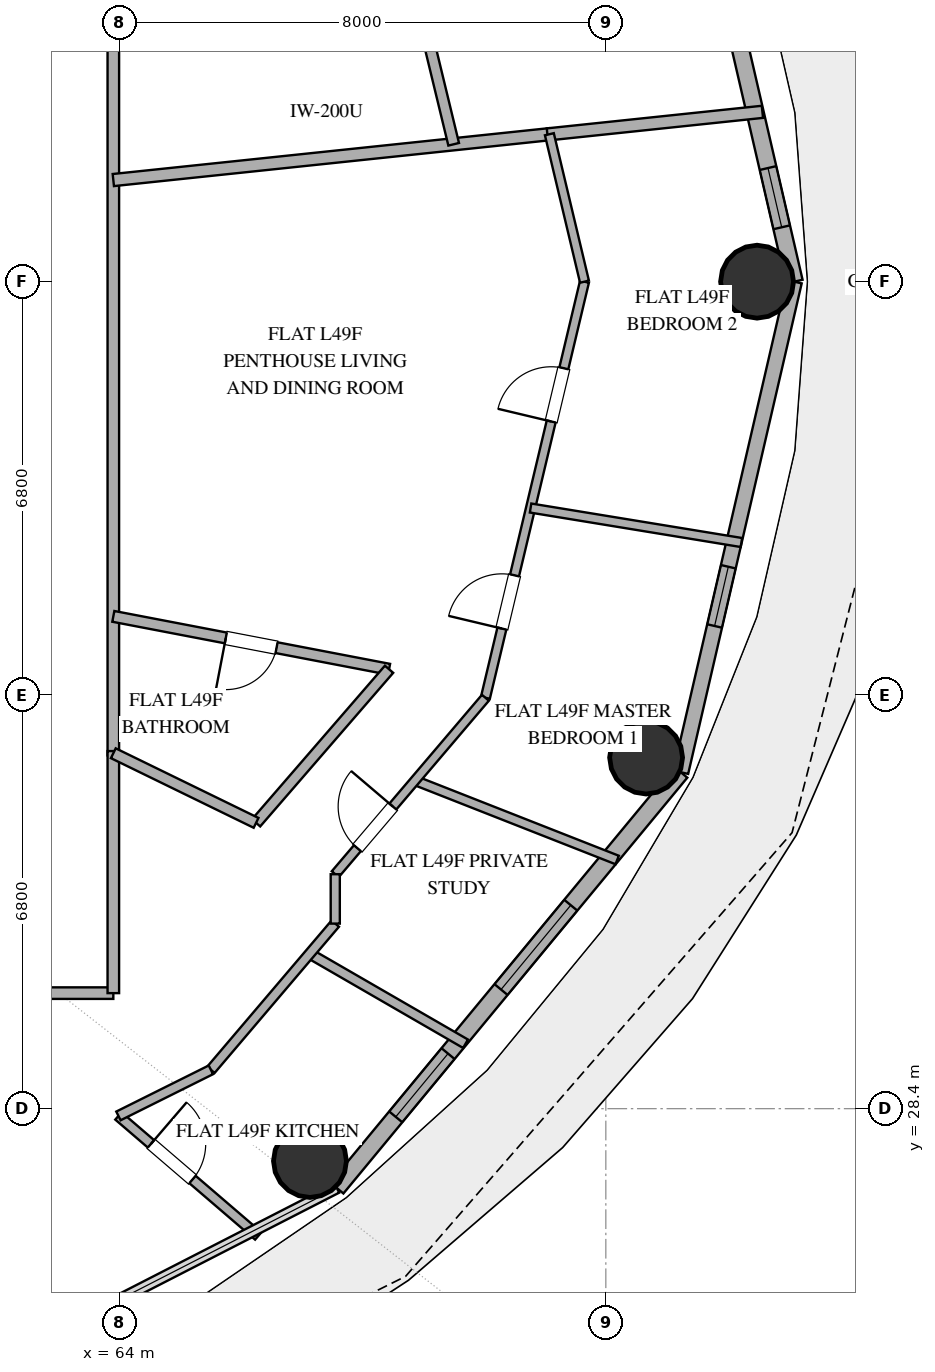
"""IFC4 building model, lengths in metres.
Left out: names, types, materials, properties, quantities, classifications, styles, units other than length and angle.
Written with IfcOpenShell. Run it as: python <this file> out.ifc"""

import sys

from ifc_helpers import new_model, si_unit, direction, frame, frame_2d, origin, origin_2d, place, context, subcontext, project, spatial, rectangle, hollow_circle, extrude, element, fill, save


model = new_model("IFC4")
c1 = context("Model", 3, precision=1e-05, world=origin(), true_north=direction((0.0, 1.0)))
c2 = subcontext(c1, "Body", "Model", "MODEL_VIEW")
j1 = project(units=[si_unit("LENGTHUNIT", "METRE"), si_unit("PLANEANGLEUNIT", "RADIAN")], contexts=[c1])
p1 = place(None, origin())
s1 = spatial("IfcSite", under=j1, at=p1, CompositionType="ELEMENT")
p2 = place(p1, origin())
s2 = spatial("IfcBuilding", under=s1, at=p2, CompositionType="ELEMENT")
p3 = place(p2, frame((0.0, 0.0, 193.8)))
s3 = spatial("IfcBuildingStorey", under=s2, at=p3, CompositionType="ELEMENT", Elevation=193.8)
for number, where, z_axis, x_axis in (
    (1, (74.487, 42.0, 0.0), (0.0, 0.0, 1.0), (1.0, 0.0, 0.0)),
    (2, (67.134, 27.54, 0.0), (0.0, 0.0, 1.0), (1.0, 0.0, 0.0)),
    (3, (72.662, 34.174, 0.0), (0.0, 0.0, 1.0), (1.0, 0.0, 0.0)),
):
    element("IfcColumn", number, at=place(p3, frame(where, z_axis=z_axis, x_axis=x_axis)), inside=s3, PredefinedType="COLUMN", context=c2, shape_type="SweptSolid", body=[
        extrude(hollow_circle(Radius=0.6, WallThickness=0.032, at=origin_2d()), origin(), (0.0, 0.0, 1.0), 3.38),
    ])
p4 = place(p3, frame((75.099, 42.0, 0.0), z_axis=(0.0, 0.0, 1.0), x_axis=(-0.225473184558, 0.974249374157, 0.0)))
e4 = element("IfcWall", 4, at=p4, inside=s3, PredefinedType="SOLIDWALL", context=c2, shape_type="SweptSolid", body=[
    extrude(rectangle(XDim=8.28, YDim=0.28, at=frame_2d((4.14, 0.0))), origin(), (0.0, 0.0, 1.0), 3.38),
])
p5 = place(p4, frame((5.344, 0.0, 0.0)))
e5 = element("IfcOpeningElement", 5, at=p5, cuts=e4, PredefinedType="OPENING", context=c2, shape_type="SweptSolid", body=[
    extrude(rectangle(XDim=1.4, YDim=2.2, at=frame_2d((0.7, 1.1))), frame((0.0, 0.15, 0.0), z_axis=(0.0, -1.0, 0.0), x_axis=(1.0, 0.0, 0.0)), (0.0, 0.0, 1.0), 0.3),
])
p6 = place(p4, frame((0.918, 0.0, 0.85)))
e6 = element("IfcOpeningElement", 6, at=p6, cuts=e4, PredefinedType="OPENING", context=c2, shape_type="SweptSolid", body=[
    extrude(rectangle(XDim=1.0, YDim=1.8, at=frame_2d((0.5, 0.9))), frame((0.0, 0.15, 0.0), z_axis=(0.0, -1.0, 0.0), x_axis=(1.0, 0.0, 0.0)), (0.0, 0.0, 1.0), 0.3),
])
p7 = place(p3, frame((67.576, 27.094, 0.0), z_axis=(0.0, 0.0, 1.0), x_axis=(0.637333477683, 0.770588111915, 0.0)))
e7 = element("IfcWall", 7, at=p7, inside=s3, PredefinedType="SOLIDWALL", context=c2, shape_type="SweptSolid", body=[
    extrude(rectangle(XDim=8.875, YDim=0.28, at=frame_2d((4.438, 0.0))), origin(), (0.0, 0.0, 1.0), 3.38),
])
p8 = place(p7, frame((1.52, 0.0, 0.85)))
e8 = element("IfcOpeningElement", 8, at=p8, cuts=e7, PredefinedType="OPENING", context=c2, shape_type="SweptSolid", body=[
    extrude(rectangle(XDim=1.35, YDim=1.8, at=frame_2d((0.675, 0.9))), frame((0.0, 0.15, 0.0), z_axis=(0.0, -1.0, 0.0), x_axis=(1.0, 0.0, 0.0)), (0.0, 0.0, 1.0), 0.3),
])
p9 = place(p7, frame((4.237, 0.0, 0.85)))
e9 = element("IfcOpeningElement", 9, at=p9, cuts=e7, PredefinedType="OPENING", context=c2, shape_type="SweptSolid", body=[
    extrude(rectangle(XDim=1.8, YDim=2.2, at=frame_2d((0.9, 1.1))), frame((0.0, 0.15, 0.0), z_axis=(0.0, -1.0, 0.0), x_axis=(1.0, 0.0, 0.0)), (0.0, 0.0, 1.0), 0.3),
])
p10 = place(p3, frame((73.232, 33.933, 0.0), z_axis=(0.0, 0.0, 1.0), x_axis=(0.225473184558, 0.974249374157, 0.0)))
e10 = element("IfcWall", 10, at=p10, inside=s3, PredefinedType="SOLIDWALL", context=c2, shape_type="SweptSolid", body=[
    extrude(rectangle(XDim=8.28, YDim=0.25, at=frame_2d((4.14, 0.0))), origin(), (0.0, 0.0, 1.0), 3.38),
])
p11 = place(p10, frame((2.469, 0.0, 0.35)))
e11 = element("IfcOpeningElement", 11, at=p11, cuts=e10, PredefinedType="OPENING", context=c2, shape_type="SweptSolid", body=[
    extrude(rectangle(XDim=1.0, YDim=1.05, at=frame_2d((0.5, 0.525))), frame((0.0, 0.135, 0.0), z_axis=(0.0, -1.0, 0.0), x_axis=(1.0, 0.0, 0.0)), (0.0, 0.0, 1.0), 0.27),
])
p12 = place(p3, frame((41.743, 30.3, 0.0), z_axis=(0.0, 0.0, 1.0), x_axis=(1.0, 0.0, 0.0)))
e12 = element("IfcWall", 12, at=p12, inside=s3, PredefinedType="PARTITIONING", context=c2, shape_type="SweptSolid", body=[
    extrude(rectangle(XDim=22.157, YDim=0.19, at=frame_2d((11.079, 0.0))), origin(), (0.0, 0.0, 1.0), 2.74),
])
p13 = place(p12, frame((7.451, 0.0, 0.0)))
e13 = element("IfcOpeningElement", 13, at=p13, cuts=e12, PredefinedType="OPENING", context=c2, shape_type="SweptSolid", body=[
    extrude(rectangle(XDim=1.0, YDim=2.2, at=frame_2d((0.5, 1.1))), frame((0.0, 0.105, 0.0), z_axis=(0.0, -1.0, 0.0), x_axis=(1.0, 0.0, 0.0)), (0.0, 0.0, 1.0), 0.21),
])
p14 = place(p12, frame((17.344, 0.0, 0.0)))
e14 = element("IfcOpeningElement", 14, at=p14, cuts=e12, PredefinedType="OPENING", context=c2, shape_type="SweptSolid", body=[
    extrude(rectangle(XDim=1.0, YDim=2.2, at=frame_2d((0.5, 1.1))), frame((0.0, 0.105, 0.0), z_axis=(0.0, -1.0, 0.0), x_axis=(1.0, 0.0, 0.0)), (0.0, 0.0, 1.0), 0.21),
])
p15 = place(p3, frame((63.9, 46.841, 0.0), z_axis=(0.0, 0.0, 1.0), x_axis=(0.0, -1.0, 0.0)))
e15 = element("IfcWall", 15, at=p15, inside=s3, PredefinedType="PARTITIONING", context=c2, shape_type="SweptSolid", body=[
    extrude(rectangle(XDim=12.632, YDim=0.19, at=frame_2d((6.316, 0.0))), origin(), (0.0, 0.0, 1.0), 2.74),
])
p16 = place(p3, frame((63.9, 43.671, 0.0), z_axis=(0.0, 0.0, 1.0), x_axis=(0.994523063153, 0.104517351942, 0.0)))
e16 = element("IfcWall", 16, at=p16, inside=s3, PredefinedType="PARTITIONING", context=c2, shape_type="SweptSolid", body=[
    extrude(rectangle(XDim=7.211, YDim=0.2, at=frame_2d((3.605, 0.0))), origin(), (0.0, 0.0, 1.0), 2.74),
])
p17 = place(p3, frame((68.435, 35.626, 0.0), z_axis=(0.0, 0.0, 1.0), x_axis=(-0.982105494501, 0.188331616227, 0.0)))
e17 = element("IfcWall", 17, at=p17, inside=s3, PredefinedType="PLUMBINGWALL", context=c2, shape_type="SweptSolid", body=[
    extrude(rectangle(XDim=4.617, YDim=0.18, at=frame_2d((2.309, 0.0))), origin(), (0.0, 0.0, 1.0), 2.74),
])
p18 = place(p17, frame((1.884, 0.0, 0.0)))
e18 = element("IfcOpeningElement", 18, at=p18, cuts=e17, PredefinedType="OPENING", context=c2, shape_type="SweptSolid", body=[
    extrude(rectangle(XDim=0.85, YDim=2.1, at=frame_2d((0.425, 1.05))), frame((0.0, 0.1, 0.0), z_axis=(0.0, -1.0, 0.0), x_axis=(1.0, 0.0, 0.0)), (0.0, 0.0, 1.0), 0.2),
])
p19 = place(p3, frame((69.498, 44.26, 0.0), z_axis=(0.0, 0.0, 1.0), x_axis=(-0.235510241151, 0.97187186723, 0.0)))
e19 = element("IfcWall", 19, at=p19, inside=s3, PredefinedType="PLUMBINGWALL", context=c2, shape_type="SweptSolid", body=[
    extrude(rectangle(XDim=4.125, YDim=0.18, at=frame_2d((2.062, 0.0))), origin(), (0.0, 0.0, 1.0), 2.74),
])
p20 = place(p3, frame((63.9, 34.281, 0.0), z_axis=(0.0, 0.0, 1.0), x_axis=(0.0, -1.0, 0.0)))
e20 = element("IfcWall", 20, at=p20, inside=s3, PredefinedType="PARTITIONING", context=c2, shape_type="SweptSolid", body=[
    extrude(rectangle(XDim=3.981, YDim=0.19, at=frame_2d((1.99, 0.0))), origin(), (0.0, 0.0, 1.0), 2.74),
])
p21 = place(p3, frame((70.019, 35.158, 0.0), z_axis=(0.0, 0.0, 1.0), x_axis=(0.231658068135, 0.972797275627, 0.0)))
e21 = element("IfcWall", 21, at=p21, inside=s3, PredefinedType="PARTITIONING", context=c2, shape_type="SweptSolid", body=[
    extrude(rectangle(XDim=7.034, YDim=0.15, at=frame_2d((3.517, 0.0))), origin(), (0.0, 0.0, 1.0), 2.74),
])
p22 = place(p21, frame((4.67, 0.0, 0.0)))
e22 = element("IfcOpeningElement", 22, at=p22, cuts=e21, PredefinedType="OPENING", context=c2, shape_type="SweptSolid", body=[
    extrude(rectangle(XDim=0.9, YDim=2.1, at=frame_2d((0.45, 1.05))), frame((0.0, 0.085, 0.0), z_axis=(0.0, -1.0, 0.0), x_axis=(1.0, 0.0, 0.0)), (0.0, 0.0, 1.0), 0.17),
])
p23 = place(p21, frame((1.17, 0.0, 0.0)))
e23 = element("IfcOpeningElement", 23, at=p23, cuts=e21, PredefinedType="OPENING", context=c2, shape_type="SweptSolid", body=[
    extrude(rectangle(XDim=0.9, YDim=2.1, at=frame_2d((0.45, 1.05))), frame((0.0, 0.085, 0.0), z_axis=(0.0, -1.0, 0.0), x_axis=(1.0, 0.0, 0.0)), (0.0, 0.0, 1.0), 0.17),
])
p24 = place(p3, frame((72.186, 32.49, 0.0), z_axis=(0.0, 0.0, 1.0), x_axis=(-0.930633495056, 0.365952589662, 0.0)))
e24 = element("IfcWall", 24, at=p24, inside=s3, PredefinedType="PARTITIONING", context=c2, shape_type="SweptSolid", body=[
    extrude(rectangle(XDim=3.573, YDim=0.15, at=frame_2d((1.786, 0.0))), origin(), (0.0, 0.0, 1.0), 2.74),
])
p25 = place(p3, frame((74.575, 44.793, 0.0), z_axis=(0.0, 0.0, 1.0), x_axis=(-0.994516359121, -0.104581123727, 0.0)))
e25 = element("IfcWall", 25, at=p25, inside=s3, PredefinedType="PARTITIONING", context=c2, shape_type="SweptSolid", body=[
    extrude(rectangle(XDim=3.555, YDim=0.2, at=frame_2d((1.778, 0.0))), origin(), (0.0, 0.0, 1.0), 2.74),
])
p26 = place(p3, frame((74.229, 37.711, 0.0), z_axis=(0.0, 0.0, 1.0), x_axis=(-0.98689451092, 0.161366738565, 0.0)))
e26 = element("IfcWall", 26, at=p26, inside=s3, PredefinedType="PARTITIONING", context=c2, shape_type="SweptSolid", body=[
    extrude(rectangle(XDim=3.513, YDim=0.15, at=frame_2d((1.757, 0.0))), origin(), (0.0, 0.0, 1.0), 2.74),
])
p27 = place(p3, frame((66.248, 33.1, 0.0), z_axis=(0.0, 0.0, 1.0), x_axis=(0.654579983518, 0.755992754712, 0.0)))
e27 = element("IfcWall", 27, at=p27, inside=s3, PredefinedType="PLUMBINGWALL", context=c2, shape_type="SweptSolid", body=[
    extrude(rectangle(XDim=3.342, YDim=0.18, at=frame_2d((1.671, 0.0))), origin(), (0.0, 0.0, 1.0), 2.74),
])
p28 = place(p3, frame((63.984, 28.281, 0.0), z_axis=(0.0, 0.0, 1.0), x_axis=(0.758829970644, -0.651288780537, 0.0)))
e28 = element("IfcWall", 28, at=p28, inside=s3, PredefinedType="PLUMBINGWALL", context=c2, shape_type="SweptSolid", body=[
    extrude(rectangle(XDim=3.031, YDim=0.16, at=frame_2d((1.515, 0.0))), origin(), (0.0, 0.0, 1.0), 2.74),
])
p29 = place(p28, frame((0.705, 0.0, 0.0)))
e29 = element("IfcOpeningElement", 29, at=p29, cuts=e28, PredefinedType="OPENING", context=c2, shape_type="SweptSolid", body=[
    extrude(rectangle(XDim=0.9, YDim=2.1, at=frame_2d((0.45, 1.05))), frame((0.0, 0.09, 0.0), z_axis=(0.0, -1.0, 0.0), x_axis=(1.0, 0.0, 0.0)), (0.0, 0.0, 1.0), 0.18),
])
p30 = place(p3, frame((69.693, 29.468, 0.0), z_axis=(0.0, 0.0, 1.0), x_axis=(-0.865888886841, 0.500236379769, 0.0)))
e30 = element("IfcWall", 30, at=p30, inside=s3, PredefinedType="PLUMBINGWALL", context=c2, shape_type="SweptSolid", body=[
    extrude(rectangle(XDim=2.96, YDim=0.16, at=frame_2d((1.48, 0.0))), origin(), (0.0, 0.0, 1.0), 2.74),
])
p31 = place(p3, frame((63.9, 34.245, 0.0), z_axis=(0.0, 0.0, 1.0), x_axis=(0.898795393126, -0.438368385374, 0.0)))
e31 = element("IfcWall", 31, at=p31, inside=s3, PredefinedType="PLUMBINGWALL", context=c2, shape_type="SweptSolid", body=[
    extrude(rectangle(XDim=2.612, YDim=0.18, at=frame_2d((1.306, 0.0))), origin(), (0.0, 0.0, 1.0), 2.74),
])
p32 = place(p3, frame((67.55, 31.443, 0.0), z_axis=(0.0, 0.0, 1.0), x_axis=(-0.647888606369, -0.761735094201, 0.0)))
e32 = element("IfcWall", 32, at=p32, inside=s3, PredefinedType="PLUMBINGWALL", context=c2, shape_type="SweptSolid", body=[
    extrude(rectangle(XDim=3.157, YDim=0.16, at=frame_2d((1.578, 0.0))), origin(), (0.0, 0.0, 1.0), 2.74),
])
p33 = place(p3, frame((71.649, 42.0, 0.0), z_axis=(0.0, 0.0, 1.0), x_axis=(-0.231642596653, 0.972800959814, 0.0)))
e33 = element("IfcWall", 33, at=p33, inside=s3, PredefinedType="PARTITIONING", context=c2, shape_type="SweptSolid", body=[
    extrude(rectangle(XDim=2.493, YDim=0.15, at=frame_2d((1.246, 0.0))), origin(), (0.0, 0.0, 1.0), 2.74),
])
p34 = place(p3, frame((67.55, 32.256, 0.0), z_axis=(0.0, 0.0, 1.0), x_axis=(0.648059335437, 0.761589848773, 0.0)))
e34 = element("IfcWall", 34, at=p34, inside=s3, PredefinedType="PARTITIONING", context=c2, shape_type="SweptSolid", body=[
    extrude(rectangle(XDim=3.811, YDim=0.15, at=frame_2d((1.905, 0.0))), origin(), (0.0, 0.0, 1.0), 2.74),
])
p35 = place(p34, frame((0.562, 0.0, 0.0)))
e35 = element("IfcOpeningElement", 35, at=p35, cuts=e34, PredefinedType="OPENING", context=c2, shape_type="SweptSolid", body=[
    extrude(rectangle(XDim=0.9, YDim=2.1, at=frame_2d((0.45, 1.05))), frame((0.0, 0.085, 0.0), z_axis=(0.0, -1.0, 0.0), x_axis=(1.0, 0.0, 0.0)), (0.0, 0.0, 1.0), 0.17),
])
p36 = place(p3, frame((65.505, 29.039, 0.0), z_axis=(0.0, 0.0, 1.0), x_axis=(-0.894972502213, -0.44612130669, 0.0)))
e36 = element("IfcWall", 36, at=p36, inside=s3, PredefinedType="PLUMBINGWALL", context=c2, shape_type="SweptSolid", body=[
    extrude(rectangle(XDim=1.699, YDim=0.16, at=frame_2d((0.85, 0.0))), origin(), (0.0, 0.0, 1.0), 2.74),
])
p37 = place(p3, frame((67.55, 31.443, 0.0), z_axis=(0.0, 0.0, 1.0), x_axis=(0.0, 1.0, 0.0)))
e37 = element("IfcWall", 37, at=p37, inside=s3, PredefinedType="PARTITIONING", context=c2, shape_type="SweptSolid", body=[
    extrude(rectangle(XDim=0.812, YDim=0.15, at=frame_2d((0.406, 0.0))), origin(), (0.0, 0.0, 1.0), 2.74),
])
p38 = place(p8, origin())
e38 = element("IfcWindow", 38, at=p38, inside=s3, PartitioningType="SINGLE_PANEL", PredefinedType="WINDOW", context=c2, shape_type="SweptSolid", body=[
    extrude(rectangle(XDim=1.35, YDim=1.8, at=frame_2d((0.675, 0.9))), frame((0.0, 0.03, 0.0), z_axis=(0.0, -1.0, 0.0), x_axis=(1.0, 0.0, 0.0)), (0.0, 0.0, 1.0), 0.06),
])
fill(e8, e38)
p39 = place(p9, origin())
e39 = element("IfcWindow", 39, at=p39, inside=s3, PartitioningType="SINGLE_PANEL", PredefinedType="WINDOW", context=c2, shape_type="SweptSolid", body=[
    extrude(rectangle(XDim=1.8, YDim=2.2, at=frame_2d((0.9, 1.1))), frame((0.0, 0.03, 0.0), z_axis=(0.0, -1.0, 0.0), x_axis=(1.0, 0.0, 0.0)), (0.0, 0.0, 1.0), 0.06),
])
fill(e9, e39)
p40 = place(p11, origin())
e40 = element("IfcWindow", 40, at=p40, inside=s3, PartitioningType="SINGLE_PANEL", PredefinedType="WINDOW", context=c2, shape_type="SweptSolid", body=[
    extrude(rectangle(XDim=1.0, YDim=1.05, at=frame_2d((0.5, 0.525))), frame((0.0, 0.03, 0.0), z_axis=(0.0, -1.0, 0.0), x_axis=(1.0, 0.0, 0.0)), (0.0, 0.0, 1.0), 0.06),
])
fill(e11, e40)
p41 = place(p6, origin())
e41 = element("IfcWindow", 41, at=p41, inside=s3, PartitioningType="SINGLE_PANEL", PredefinedType="WINDOW", context=c2, shape_type="SweptSolid", body=[
    extrude(rectangle(XDim=1.0, YDim=1.8, at=frame_2d((0.5, 0.9))), frame((0.0, 0.03, 0.0), z_axis=(0.0, -1.0, 0.0), x_axis=(1.0, 0.0, 0.0)), (0.0, 0.0, 1.0), 0.06),
])
fill(e6, e41)
p42 = place(p18, origin())
e42 = element("IfcDoor", 42, at=p42, inside=s3, OperationType="SINGLE_SWING_RIGHT", PredefinedType="DOOR", context=c2, shape_type="SweptSolid", body=[
    extrude(rectangle(XDim=0.85, YDim=2.1, at=frame_2d((0.425, 1.05))), frame((0.0, 0.025, 0.0), z_axis=(0.0, -1.0, 0.0), x_axis=(1.0, 0.0, 0.0)), (0.0, 0.0, 1.0), 0.05),
])
fill(e18, e42)
p43 = place(p22, origin())
e43 = element("IfcDoor", 43, at=p43, inside=s3, OperationType="SINGLE_SWING_LEFT", PredefinedType="DOOR", context=c2, shape_type="SweptSolid", body=[
    extrude(rectangle(XDim=0.9, YDim=2.1, at=frame_2d((0.45, 1.05))), frame((0.0, 0.025, 0.0), z_axis=(0.0, -1.0, 0.0), x_axis=(1.0, 0.0, 0.0)), (0.0, 0.0, 1.0), 0.05),
])
fill(e22, e43)
p44 = place(p23, origin())
e44 = element("IfcDoor", 44, at=p44, inside=s3, OperationType="SINGLE_SWING_LEFT", PredefinedType="DOOR", context=c2, shape_type="SweptSolid", body=[
    extrude(rectangle(XDim=0.9, YDim=2.1, at=frame_2d((0.45, 1.05))), frame((0.0, 0.025, 0.0), z_axis=(0.0, -1.0, 0.0), x_axis=(1.0, 0.0, 0.0)), (0.0, 0.0, 1.0), 0.05),
])
fill(e23, e44)
p45 = place(p29, origin())
e45 = element("IfcDoor", 45, at=p45, inside=s3, OperationType="SINGLE_SWING_LEFT", PredefinedType="DOOR", context=c2, shape_type="SweptSolid", body=[
    extrude(rectangle(XDim=0.9, YDim=2.1, at=frame_2d((0.45, 1.05))), frame((0.0, 0.025, 0.0), z_axis=(0.0, -1.0, 0.0), x_axis=(1.0, 0.0, 0.0)), (0.0, 0.0, 1.0), 0.05),
])
fill(e29, e45)
p46 = place(p35, origin())
e46 = element("IfcDoor", 46, at=p46, inside=s3, OperationType="SINGLE_SWING_RIGHT", PredefinedType="DOOR", context=c2, shape_type="SweptSolid", body=[
    extrude(rectangle(XDim=0.9, YDim=2.1, at=frame_2d((0.45, 1.05))), frame((0.0, 0.025, 0.0), z_axis=(0.0, -1.0, 0.0), x_axis=(1.0, 0.0, 0.0)), (0.0, 0.0, 1.0), 0.05),
])
fill(e35, e46)
save(model, sys.argv[1])
